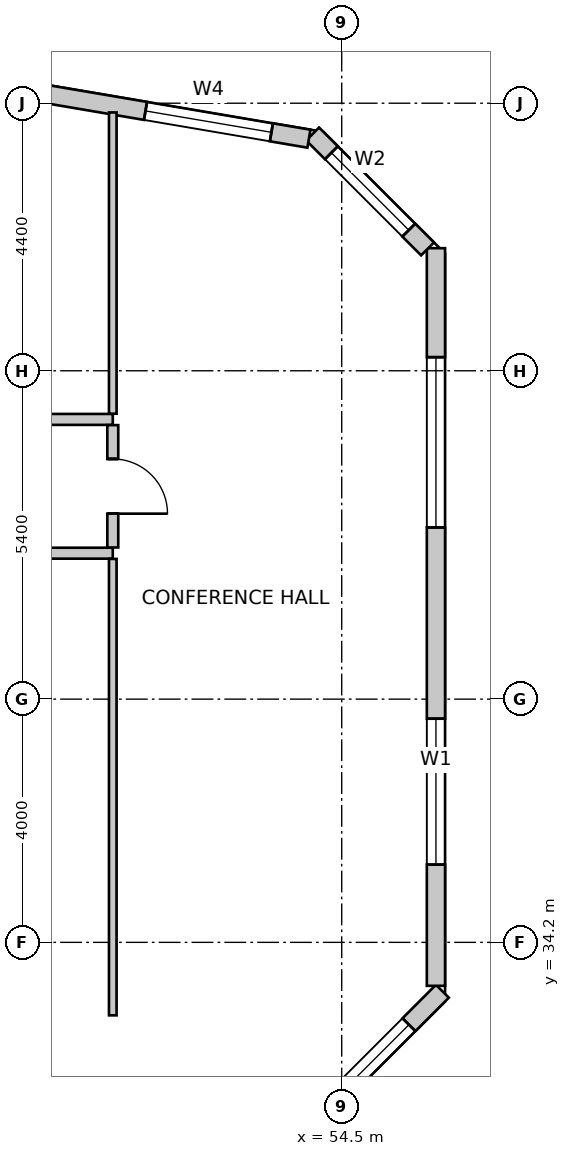
"""IFC4 building model, lengths in metres.
Left out: names, types, materials, properties, quantities, classifications, styles, units other than length and angle.
Written with IfcOpenShell. Run it as: python <this file> out.ifc"""

import sys

from ifc_helpers import new_model, si_unit, direction, frame, frame_2d, origin, place, context, subcontext, project, spatial, rectangle, extrude, source, transform, mapped, element, fill, save


model = new_model("IFC4")
c1 = context("Model", 3, precision=1e-05, world=origin(), true_north=direction((0.0, 1.0)))
c2 = subcontext(c1, "Body", "Model", "MODEL_VIEW")
j1 = project(units=[si_unit("LENGTHUNIT", "METRE"), si_unit("PLANEANGLEUNIT", "RADIAN")], contexts=[c1])
p1 = place(None, origin())
s1 = spatial("IfcSite", under=j1, at=p1, CompositionType="ELEMENT")
p2 = place(p1, origin())
s2 = spatial("IfcBuilding", under=s1, at=p2, CompositionType="ELEMENT")
p3 = place(p2, frame((0.0, 0.0, 71.0)))
s3 = spatial("IfcBuildingStorey", under=s2, at=p3, CompositionType="ELEMENT", Elevation=71.0)
p4 = place(p3, frame((53.076, 30.316, 0.0), z_axis=(0.0, 0.0, 1.0), x_axis=(0.707078757535, 0.707134803727, 0.0)))
e1 = element("IfcWall", 1, at=p4, inside=s3, PredefinedType="SOLIDWALL", context=c2, shape_type="SweptSolid", body=[
    extrude(rectangle(XDim=4.356, YDim=0.3, at=frame_2d((2.178, 0.0))), origin(), (0.0, 0.0, 1.0), 3.75),
])
m1 = source(origin(), c2, "Body", "SweptSolid", [
    extrude(rectangle(XDim=2.8, YDim=2.4, at=frame_2d((1.4, 1.2))), frame((0.0, 0.16, 0.0), z_axis=(0.0, -1.0, 0.0), x_axis=(1.0, 0.0, 0.0)), (0.0, 0.0, 1.0), 0.32),
])
p5 = place(p4, frame((0.778, 0.0, 0.85)))
e2 = element("IfcOpeningElement", 2, at=p5, cuts=e1, PredefinedType="OPENING", context=c2, shape_type="MappedRepresentation", body=[
    mapped(m1, transform((0.0, 0.0, 0.0), scale=1.0)),
])
p6 = place(p3, frame((56.05, 33.485, 0.0), z_axis=(0.0, 0.0, 1.0), x_axis=(0.0, 1.0, 0.0)))
e3 = element("IfcWall", 3, at=p6, inside=s3, PredefinedType="SOLIDWALL", context=c2, shape_type="SweptSolid", body=[
    extrude(rectangle(XDim=12.131, YDim=0.3, at=frame_2d((6.065, 0.0))), origin(), (0.0, 0.0, 1.0), 3.75),
])
m2 = source(origin(), c2, "Body", "SweptSolid", [
    extrude(rectangle(XDim=2.4, YDim=2.2, at=frame_2d((1.2, 1.1))), frame((0.0, 0.16, 0.0), z_axis=(0.0, -1.0, 0.0), x_axis=(1.0, 0.0, 0.0)), (0.0, 0.0, 1.0), 0.32),
])
p7 = place(p6, frame((1.993, 0.0, 0.85)))
e4 = element("IfcOpeningElement", 4, at=p7, cuts=e3, PredefinedType="OPENING", context=c2, shape_type="MappedRepresentation", body=[
    mapped(m2, transform((0.0, 0.0, 0.0), scale=1.0)),
])
p8 = place(p6, frame((7.538, 0.0, 0.85)))
e5 = element("IfcOpeningElement", 5, at=p8, cuts=e3, PredefinedType="OPENING", context=c2, shape_type="MappedRepresentation", body=[
    mapped(m1, transform((0.0, 0.0, 0.0), scale=1.0)),
])
p9 = place(p3, frame((55.912, 45.604, 0.0), z_axis=(0.0, 0.0, 1.0), x_axis=(-0.707152443695, 0.707061115729, 0.0)))
e6 = element("IfcWall", 6, at=p9, inside=s3, PredefinedType="SOLIDWALL", context=c2, shape_type="SweptSolid", body=[
    extrude(rectangle(XDim=2.673, YDim=0.3, at=frame_2d((1.337, 0.0))), origin(), (0.0, 0.0, 1.0), 3.75),
])
m3 = source(origin(), c2, "Body", "SweptSolid", [
    extrude(rectangle(XDim=1.8, YDim=2.1, at=frame_2d((0.9, 1.05))), frame((0.0, 0.16, 0.0), z_axis=(0.0, -1.0, 0.0), x_axis=(1.0, 0.0, 0.0)), (0.0, 0.0, 1.0), 0.32),
])
p10 = place(p9, frame((0.437, 0.0, 0.85)))
e7 = element("IfcOpeningElement", 7, at=p10, cuts=e6, PredefinedType="OPENING", context=c2, shape_type="MappedRepresentation", body=[
    mapped(m3, transform((0.0, 0.0, 0.0), scale=1.0)),
])
p11 = place(p3, frame((53.961, 47.417, 0.0), z_axis=(0.0, 0.0, 1.0), x_axis=(-0.985865713455, 0.167537443678, 0.0)))
e8 = element("IfcWall", 8, at=p11, inside=s3, PredefinedType="SOLIDWALL", context=c2, shape_type="SweptSolid", body=[
    extrude(rectangle(XDim=32.537, YDim=0.3, at=frame_2d((16.269, 0.0))), origin(), (0.0, 0.0, 1.0), 3.75),
])
m4 = source(origin(), c2, "Body", "SweptSolid", [
    extrude(rectangle(XDim=2.1, YDim=2.0, at=frame_2d((1.05, 1.0))), frame((0.0, 0.16, 0.0), z_axis=(0.0, -1.0, 0.0), x_axis=(1.0, 0.0, 0.0)), (0.0, 0.0, 1.0), 0.32),
])
p12 = place(p11, frame((0.626, 0.0, 0.85)))
e9 = element("IfcOpeningElement", 9, at=p12, cuts=e8, PredefinedType="OPENING", context=c2, shape_type="MappedRepresentation", body=[
    mapped(m4, transform((0.0, 0.0, 0.0), scale=1.0)),
])
p13 = place(p11, frame((4.504, 0.0, 0.85)))
e10 = element("IfcOpeningElement", 10, at=p13, cuts=e8, PredefinedType="OPENING", context=c2, shape_type="MappedRepresentation", body=[
    mapped(m2, transform((0.0, 0.0, 0.0), scale=1.0)),
])
p14 = place(p11, frame((8.768, 0.0, 0.85)))
e11 = element("IfcOpeningElement", 11, at=p14, cuts=e8, PredefinedType="OPENING", context=c2, shape_type="MappedRepresentation", body=[
    mapped(m1, transform((0.0, 0.0, 0.0), scale=1.0)),
])
p15 = place(p11, frame((14.234, 0.0, 0.85)))
e12 = element("IfcOpeningElement", 12, at=p15, cuts=e8, PredefinedType="OPENING", context=c2, shape_type="MappedRepresentation", body=[
    mapped(m2, transform((0.0, 0.0, 0.0), scale=1.0)),
])
p16 = place(p11, frame((19.222, 0.0, 0.85)))
e13 = element("IfcOpeningElement", 13, at=p16, cuts=e8, PredefinedType="OPENING", context=c2, shape_type="MappedRepresentation", body=[
    mapped(m1, transform((0.0, 0.0, 0.0), scale=1.0)),
])
p17 = place(p11, frame((25.095, 0.0, 0.85)))
e14 = element("IfcOpeningElement", 14, at=p17, cuts=e8, PredefinedType="OPENING", context=c2, shape_type="MappedRepresentation", body=[
    mapped(m2, transform((0.0, 0.0, 0.0), scale=1.0)),
])
p18 = place(p11, frame((29.595, 0.0, 0.85)))
e15 = element("IfcOpeningElement", 15, at=p18, cuts=e8, PredefinedType="OPENING", context=c2, shape_type="MappedRepresentation", body=[
    mapped(m2, transform((0.0, 0.0, 0.0), scale=1.0)),
])
p19 = place(p3, frame((50.735, 40.6, 0.0), z_axis=(0.0, 0.0, 1.0), x_axis=(-1.0, 0.0, 0.0)))
e16 = element("IfcWall", 16, at=p19, inside=s3, PredefinedType="PARTITIONING", context=c2, shape_type="SweptSolid", body=[
    extrude(rectangle(XDim=5.483, YDim=0.18, at=frame_2d((2.742, 0.0))), origin(), (0.0, 0.0, 1.0), 3.125),
])
m5 = source(origin(), c2, "Body", "SweptSolid", [
    extrude(rectangle(XDim=0.9, YDim=2.15, at=frame_2d((0.45, 1.075))), frame((0.0, 0.1, 0.0), z_axis=(0.0, -1.0, 0.0), x_axis=(1.0, 0.0, 0.0)), (0.0, 0.0, 1.0), 0.2),
])
p20 = place(p19, frame((4.181, 0.0, 0.0)))
e17 = element("IfcOpeningElement", 17, at=p20, cuts=e16, PredefinedType="OPENING", context=c2, shape_type="MappedRepresentation", body=[
    mapped(m5, transform((0.0, 0.0, 0.0), scale=1.0)),
])
p21 = place(p3, frame((41.662, 42.8, 0.0), z_axis=(0.0, 0.0, 1.0), x_axis=(1.0, 0.0, 0.0)))
e18 = element("IfcWall", 18, at=p21, inside=s3, PredefinedType="PARTITIONING", context=c2, shape_type="SweptSolid", body=[
    extrude(rectangle(XDim=9.073, YDim=0.18, at=frame_2d((4.537, 0.0))), origin(), (0.0, 0.0, 1.0), 3.125),
])
p22 = place(p21, frame((4.026, 0.0, 0.0)))
e19 = element("IfcOpeningElement", 19, at=p22, cuts=e18, PredefinedType="OPENING", context=c2, shape_type="MappedRepresentation", body=[
    mapped(m5, transform((0.0, 0.0, 0.0), scale=1.0)),
])
p23 = place(p3, frame((50.735, 42.706, 0.0), z_axis=(0.0, 0.0, 1.0), x_axis=(0.0, -1.0, 0.0)))
e20 = element("IfcWall", 20, at=p23, inside=s3, PredefinedType="PARTITIONING", context=c2, shape_type="SweptSolid", body=[
    extrude(rectangle(XDim=2.012, YDim=0.18, at=frame_2d((1.006, 0.0))), origin(), (0.0, 0.0, 1.0), 3.75),
])
p24 = place(p23, frame((0.556, 0.0, 0.0)))
e21 = element("IfcOpeningElement", 21, at=p24, cuts=e20, PredefinedType="OPENING", context=c2, shape_type="MappedRepresentation", body=[
    mapped(m5, transform((0.0, 0.0, 0.0), scale=1.0)),
])
p25 = place(p3, frame((50.735, 40.506, 0.0), z_axis=(0.0, 0.0, 1.0), x_axis=(0.0, -1.0, 0.0)))
e22 = element("IfcWall", 22, at=p25, inside=s3, PredefinedType="PARTITIONING", context=c2, shape_type="SweptSolid", body=[
    extrude(rectangle(XDim=7.506, YDim=0.125, at=frame_2d((3.753, 0.0))), origin(), (0.0, 0.0, 1.0), 3.75),
])
p26 = place(p3, frame((50.735, 47.848, 0.0), z_axis=(0.0, 0.0, 1.0), x_axis=(0.0, -1.0, 0.0)))
e23 = element("IfcWall", 23, at=p26, inside=s3, PredefinedType="PARTITIONING", context=c2, shape_type="SweptSolid", body=[
    extrude(rectangle(XDim=4.954, YDim=0.125, at=frame_2d((2.477, 0.0))), origin(), (0.0, 0.0, 1.0), 3.75),
])
m6 = source(origin(), c2, "Body", "SweptSolid", [
    extrude(rectangle(XDim=2.8, YDim=2.4, at=frame_2d((1.4, 1.2))), frame((0.0, -0.015, 0.0), z_axis=(0.0, -1.0, 0.0), x_axis=(1.0, 0.0, 0.0)), (0.0, 0.0, 1.0), 0.06),
])
p27 = place(p5, origin())
e24 = element("IfcWindow", 24, at=p27, inside=s3, PartitioningType="SINGLE_PANEL", PredefinedType="WINDOW", context=c2, shape_type="MappedRepresentation", body=[
    mapped(m6, transform((0.0, 0.0, 0.0), scale=1.0)),
])
fill(e2, e24)
m7 = source(origin(), c2, "Body", "SweptSolid", [
    extrude(rectangle(XDim=2.4, YDim=2.2, at=frame_2d((1.2, 1.1))), frame((0.0, -0.015, 0.0), z_axis=(0.0, -1.0, 0.0), x_axis=(1.0, 0.0, 0.0)), (0.0, 0.0, 1.0), 0.06),
])
p28 = place(p7, origin())
e25 = element("IfcWindow", 25, at=p28, inside=s3, PartitioningType="SINGLE_PANEL", PredefinedType="WINDOW", context=c2, shape_type="MappedRepresentation", body=[
    mapped(m7, transform((0.0, 0.0, 0.0), scale=1.0)),
])
fill(e4, e25)
p29 = place(p8, origin())
e26 = element("IfcWindow", 26, at=p29, inside=s3, PartitioningType="SINGLE_PANEL", PredefinedType="WINDOW", context=c2, shape_type="MappedRepresentation", body=[
    mapped(m6, transform((0.0, 0.0, 0.0), scale=1.0)),
])
fill(e5, e26)
m8 = source(origin(), c2, "Body", "SweptSolid", [
    extrude(rectangle(XDim=1.8, YDim=2.1, at=frame_2d((0.9, 1.05))), frame((0.0, -0.015, 0.0), z_axis=(0.0, -1.0, 0.0), x_axis=(1.0, 0.0, 0.0)), (0.0, 0.0, 1.0), 0.06),
])
p30 = place(p10, origin())
e27 = element("IfcWindow", 27, at=p30, inside=s3, PartitioningType="SINGLE_PANEL", PredefinedType="WINDOW", context=c2, shape_type="MappedRepresentation", body=[
    mapped(m8, transform((0.0, 0.0, 0.0), scale=1.0)),
])
fill(e7, e27)
m9 = source(origin(), c2, "Body", "SweptSolid", [
    extrude(rectangle(XDim=2.1, YDim=2.0, at=frame_2d((1.05, 1.0))), frame((0.0, -0.015, 0.0), z_axis=(0.0, -1.0, 0.0), x_axis=(1.0, 0.0, 0.0)), (0.0, 0.0, 1.0), 0.06),
])
p31 = place(p12, origin())
e28 = element("IfcWindow", 28, at=p31, inside=s3, PartitioningType="SINGLE_PANEL", PredefinedType="WINDOW", context=c2, shape_type="MappedRepresentation", body=[
    mapped(m9, transform((0.0, 0.0, 0.0), scale=1.0)),
])
fill(e9, e28)
m10 = source(origin(), c2, "Body", "SweptSolid", [
    extrude(rectangle(XDim=0.9, YDim=2.15, at=frame_2d((0.45, 1.075))), frame((0.0, 0.025, 0.0), z_axis=(0.0, -1.0, 0.0), x_axis=(1.0, 0.0, 0.0)), (0.0, 0.0, 1.0), 0.05),
])
p32 = place(p24, origin())
e29 = element("IfcDoor", 29, at=p32, inside=s3, OperationType="SINGLE_SWING_RIGHT", PredefinedType="DOOR", context=c2, shape_type="MappedRepresentation", body=[
    mapped(m10, transform((0.0, 0.0, 0.0), scale=1.0)),
])
fill(e21, e29)
save(model, sys.argv[1])
